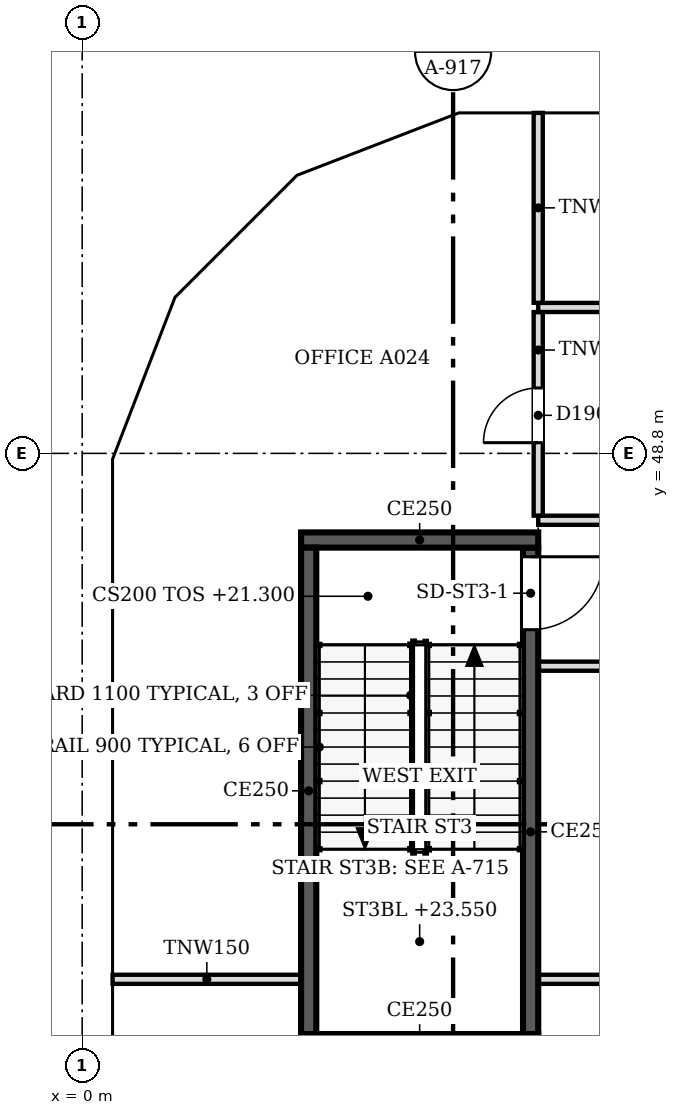
"""IFC4 building model, lengths in metres.
Left out: names, types, materials, properties, quantities, classifications, styles, units other than length and angle.
Written with IfcOpenShell. Run it as: python <this file> out.ifc"""

import sys

from ifc_helpers import new_model, si_unit, direction, frame, frame_2d, origin, place, context, subcontext, project, spatial, polyline, rectangle, outline, extrude, faceted_brep, source, transform, mapped, element, fill, save


model = new_model("IFC4")
c1 = context("Model", 3, precision=1e-05, world=origin(), true_north=direction((0.0, 1.0)))
c2 = subcontext(c1, "Body", "Model", "MODEL_VIEW")
j1 = project(units=[si_unit("LENGTHUNIT", "METRE"), si_unit("PLANEANGLEUNIT", "RADIAN")], contexts=[c1])
p1 = place(None, origin())
s1 = spatial("IfcSite", under=j1, at=p1, CompositionType="ELEMENT")
p2 = place(p1, origin())
s2 = spatial("IfcBuilding", under=s1, at=p2, CompositionType="ELEMENT")
p3 = place(p2, frame((0.0, 0.0, 21.3)))
s3 = spatial("IfcBuildingStorey", under=s2, at=p3, CompositionType="ELEMENT", Elevation=21.3)
m1 = source(origin(), c2, "Body", "Brep", [
    faceted_brep([(3.05, -0.25, 0.0), (6.053, -0.25, 4.5), (3.05, -0.25, 9.0), (0.0, -0.25, 4.5), (0.0, 0.25, 4.5), (3.05, 0.25, 9.0), (6.007, 0.25, 4.57), (6.007, 0.25, 4.43), (3.05, 0.25, 0.0), (6.053, 0.0, 4.5)], [[[0, 1, 2, 3]], [[4, 5, 6, 7, 8]], [[8, 7, 9, 1, 0]], [[6, 5, 2, 1, 9]], [[5, 4, 3, 2]], [[4, 8, 0, 3]], [[9, 7, 6]]]),
])
p4 = place(p3, frame((12.2, 54.65, -4.5), z_axis=(0.0, 0.0, 1.0), x_axis=(-1.0, 0.0, 0.0)))
e1 = element("IfcWall", 1, at=p4, inside=s3, PredefinedType="SOLIDWALL", context=c2, shape_type="MappedRepresentation", body=[
    mapped(m1, transform((0.0, 0.0, 0.0), scale=1.0)),
])
m2 = source(origin(), c2, "Body", "SweptSolid", [
    extrude(outline(polyline([(3.048, 0.448), (5.753, 4.5), (3.048, 8.552), (0.302, 4.5), (3.048, 0.448)])), frame((0.0, 0.26, 0.0), z_axis=(0.0, -1.0, 0.0), x_axis=(1.0, 0.0, 0.0)), (0.0, 0.0, 1.0), 0.52),
])
p5 = place(p4, origin())
e2 = element("IfcOpeningElement", 2, at=p5, cuts=e1, PredefinedType="OPENING", context=c2, shape_type="MappedRepresentation", body=[
    mapped(m2, transform((0.0, 0.0, 0.0), scale=1.0)),
])
m3 = source(origin(), c2, "Body", "Brep", [
    faceted_brep([(2.95, -0.25, 0.0), (3.003, -0.25, 0.081), (3.003, -0.25, 8.919), (2.95, -0.25, 9.0), (0.0, -0.25, 4.5), (0.047, 0.25, 4.571), (2.898, 0.25, 8.919), (2.898, 0.25, 0.081), (0.047, 0.25, 4.429), (2.95, 0.0, 0.0), (2.95, 0.0, 9.0), (0.0, 0.0, 4.5)], [[[0, 1, 2, 3, 4]], [[5, 6, 7, 8]], [[1, 0, 9]], [[10, 3, 2]], [[6, 5, 11, 4, 3, 10]], [[8, 7, 9, 0, 4, 11]], [[8, 11, 5]], [[1, 9, 7, 6, 10, 2]]]),
])
p6 = place(p3, frame((6.146, 54.65, -4.5), z_axis=(0.0, 0.0, 1.0), x_axis=(-0.932997369089, -0.359883188373, 0.0)))
e3 = element("IfcWall", 3, at=p6, inside=s3, PredefinedType="SOLIDWALL", context=c2, shape_type="MappedRepresentation", body=[
    mapped(m3, transform((0.0, 0.0, 0.0), scale=1.0)),
])
m4 = source(origin(), c2, "Body", "SweptSolid", [
    extrude(outline(polyline([(2.75, 8.239), (0.299, 4.5), (2.75, 0.761), (2.75, 8.239)])), frame((0.0, 0.26, 0.0), z_axis=(0.0, -1.0, 0.0), x_axis=(1.0, 0.0, 0.0)), (0.0, 0.0, 1.0), 0.52),
])
p7 = place(p6, origin())
e4 = element("IfcOpeningElement", 4, at=p7, cuts=e3, PredefinedType="OPENING", context=c2, shape_type="MappedRepresentation", body=[
    mapped(m4, transform((0.0, 0.0, 0.0), scale=1.0)),
])
m5 = source(origin(), c2, "Body", "Brep", [
    faceted_brep([(0.053, -0.25, 0.0), (2.997, -0.25, 4.5), (0.053, -0.25, 9.0), (0.0, -0.25, 8.919), (0.0, -0.25, 0.081), (0.106, 0.25, 8.919), (2.944, 0.25, 4.581), (2.944, 0.25, 4.419), (0.106, 0.25, 0.081), (2.997, 0.0, 4.5), (0.053, 0.0, 0.0), (0.053, 0.0, 9.0)], [[[0, 1, 2, 3, 4]], [[5, 6, 7, 8]], [[8, 7, 9, 1, 0, 10]], [[6, 5, 11, 2, 1, 9]], [[3, 2, 11]], [[10, 0, 4]], [[8, 10, 4, 3, 11, 5]], [[9, 7, 6]]]),
])
p8 = place(p3, frame((3.431, 53.625, -4.5), z_axis=(0.0, 0.0, 1.0), x_axis=(-0.707106781187, -0.707106781187, 0.0)))
e5 = element("IfcWall", 5, at=p8, inside=s3, PredefinedType="SOLIDWALL", context=c2, shape_type="MappedRepresentation", body=[
    mapped(m5, transform((0.0, 0.0, 0.0), scale=1.0)),
])
m6 = source(origin(), c2, "Body", "SweptSolid", [
    extrude(outline(polyline([(0.253, 0.762), (2.698, 4.5), (0.253, 8.238), (0.253, 0.762)])), frame((0.0, 0.26, 0.0), z_axis=(0.0, -1.0, 0.0), x_axis=(1.0, 0.0, 0.0)), (0.0, 0.0, 1.0), 0.52),
])
p9 = place(p8, origin())
e6 = element("IfcOpeningElement", 6, at=p9, cuts=e5, PredefinedType="OPENING", context=c2, shape_type="MappedRepresentation", body=[
    mapped(m6, transform((0.0, 0.0, 0.0), scale=1.0)),
])
m7 = source(origin(), c2, "Body", "Brep", [
    faceted_brep([(2.95, -0.25, 0.0), (2.997, -0.25, 0.07), (2.997, -0.25, 8.93), (2.95, -0.25, 9.0), (0.0, -0.25, 4.5), (0.053, 0.25, 4.581), (2.904, 0.25, 8.929), (2.904, 0.25, 0.071), (0.053, 0.25, 4.419), (2.95, 0.0, 0.0), (2.95, 0.0, 9.0), (0.0, 0.0, 4.5)], [[[0, 1, 2, 3, 4]], [[5, 6, 7, 8]], [[1, 0, 9]], [[10, 3, 2]], [[6, 5, 11, 4, 3, 10]], [[8, 7, 9, 0, 4, 11]], [[8, 11, 5]], [[1, 9, 7, 6, 10, 2]]]),
])
p10 = place(p3, frame((1.312, 51.506, -4.5), z_axis=(0.0, 0.0, 1.0), x_axis=(-0.359944998003, -0.932973525033, 0.0)))
e7 = element("IfcWall", 7, at=p10, inside=s3, PredefinedType="SOLIDWALL", context=c2, shape_type="MappedRepresentation", body=[
    mapped(m7, transform((0.0, 0.0, 0.0), scale=1.0)),
])
p11 = place(p10, origin())
e8 = element("IfcOpeningElement", 8, at=p11, cuts=e7, PredefinedType="OPENING", context=c2, shape_type="MappedRepresentation", body=[
    mapped(m4, transform((0.0, 0.0, 0.0), scale=1.0)),
])
m8 = source(origin(), c2, "Body", "Brep", [
    faceted_brep([(0.047, -0.25, 0.0), (3.05, -0.25, 4.5), (0.047, -0.25, 9.0), (0.0, -0.25, 8.929), (0.0, -0.25, 0.071), (0.093, 0.25, 8.93), (3.05, 0.25, 4.5), (0.093, 0.25, 0.07), (0.047, 0.0, 0.0), (0.047, 0.0, 9.0)], [[[0, 1, 2, 3, 4]], [[5, 6, 7]], [[7, 6, 1, 0, 8]], [[6, 5, 9, 2, 1]], [[3, 2, 9]], [[8, 0, 4]], [[7, 8, 4, 3, 9, 5]]]),
])
p12 = place(p3, frame((0.25, 48.8, -4.5), z_axis=(0.0, 0.0, 1.0), x_axis=(0.0, -1.0, 0.0)))
e9 = element("IfcWall", 9, at=p12, inside=s3, PredefinedType="SOLIDWALL", context=c2, shape_type="MappedRepresentation", body=[
    mapped(m8, transform((0.0, 0.0, 0.0), scale=1.0)),
])
m9 = source(origin(), c2, "Body", "SweptSolid", [
    extrude(outline(polyline([(0.247, 0.75), (2.75, 4.5), (0.247, 8.25), (0.247, 0.75)])), frame((0.0, 0.26, 0.0), z_axis=(0.0, -1.0, 0.0), x_axis=(1.0, 0.0, 0.0)), (0.0, 0.0, 1.0), 0.52),
])
p13 = place(p12, origin())
e10 = element("IfcOpeningElement", 10, at=p13, cuts=e9, PredefinedType="OPENING", context=c2, shape_type="MappedRepresentation", body=[
    mapped(m9, transform((0.0, 0.0, 0.0), scale=1.0)),
])
m10 = source(origin(), c2, "Body", "SweptSolid", [
    extrude(outline(polyline([(3.05, 0.0), (6.1, 4.5), (3.05, 9.0), (0.0, 4.5), (3.05, 0.0)])), frame((0.0, 0.25, 0.0), z_axis=(0.0, -1.0, 0.0), x_axis=(1.0, 0.0, 0.0)), (0.0, 0.0, 1.0), 0.5),
])
p14 = place(p3, frame((0.25, 45.75, -4.5), z_axis=(0.0, 0.0, 1.0), x_axis=(0.0, -1.0, 0.0)))
e11 = element("IfcWall", 11, at=p14, inside=s3, PredefinedType="SOLIDWALL", context=c2, shape_type="MappedRepresentation", body=[
    mapped(m10, transform((0.0, 0.0, 0.0), scale=1.0)),
])
m11 = source(origin(), c2, "Body", "SweptSolid", [
    extrude(outline(polyline([(3.05, 0.446), (5.798, 4.5), (3.05, 8.554), (0.302, 4.5), (3.05, 0.446)])), frame((0.0, 0.26, 0.0), z_axis=(0.0, -1.0, 0.0), x_axis=(1.0, 0.0, 0.0)), (0.0, 0.0, 1.0), 0.52),
])
p15 = place(p14, origin())
e12 = element("IfcOpeningElement", 12, at=p15, cuts=e11, PredefinedType="OPENING", context=c2, shape_type="MappedRepresentation", body=[
    mapped(m11, transform((0.0, 0.0, 0.0), scale=1.0)),
])
m12 = source(origin(), c2, "Body", "Brep", [
    faceted_brep([(3.05, -0.25, 0.0), (6.1, -0.25, 4.5), (6.1, -0.25, 4.5), (3.05, -0.25, 9.0), (0.0, -0.25, 4.5), (0.0, 0.25, 4.5), (3.05, 0.25, 9.0), (6.1, 0.25, 4.5), (6.1, 0.25, 4.5), (3.05, 0.25, 0.0)], [[[0, 1, 2, 3, 4]], [[5, 6, 7, 8, 9]], [[9, 8, 1, 0]], [[7, 6, 3, 2]], [[6, 5, 4, 3]], [[5, 9, 0, 4]], [[1, 8, 7, 2]]]),
])
p16 = place(p3, frame((0.25, 39.65, -4.5), z_axis=(0.0, 0.0, 1.0), x_axis=(0.0, -1.0, 0.0)))
e13 = element("IfcWall", 13, at=p16, inside=s3, PredefinedType="SOLIDWALL", context=c2, shape_type="MappedRepresentation", body=[
    mapped(m12, transform((0.0, 0.0, 0.0), scale=1.0)),
])
p17 = place(p16, origin())
e14 = element("IfcOpeningElement", 14, at=p17, cuts=e13, PredefinedType="OPENING", context=c2, shape_type="MappedRepresentation", body=[
    mapped(m11, transform((0.0, 0.0, 0.0), scale=1.0)),
])
m13 = source(origin(), c2, "Body", "Brep", [
    faceted_brep([(3.003, -0.25, 0.0), (3.05, -0.25, 0.071), (3.05, -0.25, 4.5), (0.0, -0.25, 4.5), (0.0, 0.25, 4.5), (2.957, 0.25, 4.5), (2.957, 0.25, 0.07), (3.003, 0.0, 0.0)], [[[0, 1, 2, 3]], [[4, 5, 6]], [[1, 0, 7]], [[5, 4, 3, 2]], [[4, 6, 7, 0, 3]], [[1, 7, 6, 5, 2]]]),
])
p18 = place(p3, frame((9.15, 54.65, 0.0), z_axis=(0.0, 0.0, 1.0), x_axis=(-1.0, 0.0, 0.0)))
e15 = element("IfcWall", 15, at=p18, inside=s3, PredefinedType="SOLIDWALL", context=c2, shape_type="MappedRepresentation", body=[
    mapped(m13, transform((0.0, 0.0, 0.0), scale=1.0)),
])
m14 = source(origin(), c2, "Body", "SweptSolid", [
    extrude(outline(polyline([(2.803, 4.25), (0.468, 4.25), (2.803, 0.75), (2.803, 4.25)])), frame((0.0, 0.26, 0.0), z_axis=(0.0, -1.0, 0.0), x_axis=(1.0, 0.0, 0.0)), (0.0, 0.0, 1.0), 0.52),
])
p19 = place(p18, origin())
e16 = element("IfcOpeningElement", 16, at=p19, cuts=e15, PredefinedType="OPENING", context=c2, shape_type="MappedRepresentation", body=[
    mapped(m14, transform((0.0, 0.0, 0.0), scale=1.0)),
])
m15 = source(origin(), c2, "Body", "Brep", [
    faceted_brep([(0.047, -0.25, 0.0), (2.997, -0.25, 4.5), (0.0, -0.25, 4.5), (0.0, -0.25, 0.07), (0.093, 0.25, 4.5), (2.944, 0.25, 4.5), (2.944, 0.25, 4.419), (0.093, 0.25, 0.071), (2.997, 0.0, 4.5), (0.047, 0.0, 0.0)], [[[0, 1, 2, 3]], [[4, 5, 6, 7]], [[7, 6, 8, 1, 0, 9]], [[5, 4, 2, 1, 8]], [[9, 0, 3]], [[7, 9, 3, 2, 4]], [[6, 5, 8]]]),
])
p20 = place(p3, frame((6.19, 54.667, 0.0), z_axis=(0.0, 0.0, 1.0), x_axis=(-0.932990326376, -0.359901446078, 0.0)))
e17 = element("IfcWall", 17, at=p20, inside=s3, PredefinedType="SOLIDWALL", context=c2, shape_type="MappedRepresentation", body=[
    mapped(m15, transform((0.0, 0.0, 0.0), scale=1.0)),
])
m16 = source(origin(), c2, "Body", "SweptSolid", [
    extrude(outline(polyline([(0.247, 0.761), (2.534, 4.25), (0.247, 4.25), (0.247, 0.761)])), frame((0.0, 0.26, 0.0), z_axis=(0.0, -1.0, 0.0), x_axis=(1.0, 0.0, 0.0)), (0.0, 0.0, 1.0), 0.52),
])
p21 = place(p20, origin())
e18 = element("IfcOpeningElement", 18, at=p21, cuts=e17, PredefinedType="OPENING", context=c2, shape_type="MappedRepresentation", body=[
    mapped(m16, transform((0.0, 0.0, 0.0), scale=1.0)),
])
m17 = source(origin(), c2, "Body", "Brep", [
    faceted_brep([(2.944, -0.25, 0.0), (2.997, -0.25, 0.081), (2.997, -0.25, 4.5), (0.0, -0.25, 4.5), (0.053, 0.25, 4.5), (2.891, 0.25, 4.5), (2.891, 0.25, 0.081), (0.053, 0.25, 4.419), (2.944, 0.0, 0.0), (0.0, 0.0, 4.5)], [[[0, 1, 2, 3]], [[4, 5, 6, 7]], [[1, 0, 8]], [[5, 4, 9, 3, 2]], [[7, 6, 8, 0, 3, 9]], [[7, 9, 4]], [[1, 8, 6, 5, 2]]]),
])
p22 = place(p3, frame((3.394, 53.588, 0.0), z_axis=(0.0, 0.0, 1.0), x_axis=(-0.707106781187, -0.707106781187, 0.0)))
e19 = element("IfcWall", 19, at=p22, inside=s3, PredefinedType="SOLIDWALL", context=c2, shape_type="MappedRepresentation", body=[
    mapped(m17, transform((0.0, 0.0, 0.0), scale=1.0)),
])
m18 = source(origin(), c2, "Body", "SweptSolid", [
    extrude(outline(polyline([(2.744, 4.25), (0.462, 4.25), (2.744, 0.762), (2.744, 4.25)])), frame((0.0, 0.26, 0.0), z_axis=(0.0, -1.0, 0.0), x_axis=(1.0, 0.0, 0.0)), (0.0, 0.0, 1.0), 0.52),
])
p23 = place(p22, origin())
e20 = element("IfcOpeningElement", 20, at=p23, cuts=e19, PredefinedType="OPENING", context=c2, shape_type="MappedRepresentation", body=[
    mapped(m18, transform((0.0, 0.0, 0.0), scale=1.0)),
])
m19 = source(origin(), c2, "Body", "Brep", [
    faceted_brep([(0.053, -0.25, 0.0), (3.003, -0.25, 4.5), (0.0, -0.25, 4.5), (0.0, -0.25, 0.081), (0.106, 0.25, 4.5), (2.957, 0.25, 4.5), (2.957, 0.25, 4.429), (0.106, 0.25, 0.081), (3.003, 0.0, 4.5), (0.053, 0.0, 0.0)], [[[0, 1, 2, 3]], [[4, 5, 6, 7]], [[7, 6, 8, 1, 0, 9]], [[5, 4, 2, 1, 8]], [[9, 0, 3]], [[7, 9, 3, 2, 4]], [[6, 5, 8]]]),
])
p24 = place(p3, frame((1.331, 51.556, 0.0), z_axis=(0.0, 0.0, 1.0), x_axis=(-0.35992665181, -0.932980602862, 0.0)))
e21 = element("IfcWall", 21, at=p24, inside=s3, PredefinedType="SOLIDWALL", context=c2, shape_type="MappedRepresentation", body=[
    mapped(m19, transform((0.0, 0.0, 0.0), scale=1.0)),
])
m20 = source(origin(), c2, "Body", "SweptSolid", [
    extrude(outline(polyline([(0.253, 0.761), (2.541, 4.25), (0.253, 4.25), (0.253, 0.761)])), frame((0.0, 0.26, 0.0), z_axis=(0.0, -1.0, 0.0), x_axis=(1.0, 0.0, 0.0)), (0.0, 0.0, 1.0), 0.52),
])
p25 = place(p24, origin())
e22 = element("IfcOpeningElement", 22, at=p25, cuts=e21, PredefinedType="OPENING", context=c2, shape_type="MappedRepresentation", body=[
    mapped(m20, transform((0.0, 0.0, 0.0), scale=1.0)),
])
m21 = source(origin(), c2, "Body", "Brep", [
    faceted_brep([(3.003, -0.25, 0.0), (6.053, -0.25, 4.5), (0.0, -0.25, 4.5), (0.047, 0.25, 4.5), (6.053, 0.25, 4.5), (3.003, 0.25, 0.0), (0.047, 0.25, 4.43), (0.0, 0.0, 4.5)], [[[0, 1, 2]], [[3, 4, 5, 6]], [[5, 4, 1, 0]], [[4, 3, 7, 2, 1]], [[6, 5, 0, 2, 7]], [[6, 7, 3]]]),
])
p26 = place(p3, frame((0.25, 48.753, 0.0), z_axis=(0.0, 0.0, 1.0), x_axis=(0.0, -1.0, 0.0)))
e23 = element("IfcWall", 23, at=p26, inside=s3, PredefinedType="SOLIDWALL", context=c2, shape_type="MappedRepresentation", body=[
    mapped(m21, transform((0.0, 0.0, 0.0), scale=1.0)),
])
m22 = source(origin(), c2, "Body", "SweptSolid", [
    extrude(outline(polyline([(3.005, 0.448), (5.582, 4.25), (0.468, 4.25), (3.005, 0.448)])), frame((0.0, 0.26, 0.0), z_axis=(0.0, -1.0, 0.0), x_axis=(1.0, 0.0, 0.0)), (0.0, 0.0, 1.0), 0.52),
])
p27 = place(p26, origin())
e24 = element("IfcOpeningElement", 24, at=p27, cuts=e23, PredefinedType="OPENING", context=c2, shape_type="MappedRepresentation", body=[
    mapped(m22, transform((0.0, 0.0, 0.0), scale=1.0)),
])
m23 = source(origin(), c2, "Body", "Brep", [
    faceted_brep([(3.05, -0.25, 0.0), (6.1, -0.25, 4.5), (6.1, -0.25, 4.5), (0.0, -0.25, 4.5), (0.0, 0.25, 4.5), (6.1, 0.25, 4.5), (6.1, 0.25, 4.5), (3.05, 0.25, 0.0)], [[[0, 1, 2, 3]], [[4, 5, 6, 7]], [[7, 6, 1, 0]], [[5, 4, 3, 2]], [[4, 7, 0, 3]], [[1, 6, 5, 2]]]),
])
p28 = place(p3, frame((0.25, 42.7, 0.0), z_axis=(0.0, 0.0, 1.0), x_axis=(0.0, -1.0, 0.0)))
e25 = element("IfcWall", 25, at=p28, inside=s3, PredefinedType="SOLIDWALL", context=c2, shape_type="MappedRepresentation", body=[
    mapped(m23, transform((0.0, 0.0, 0.0), scale=1.0)),
])
m24 = source(origin(), c2, "Body", "SweptSolid", [
    extrude(outline(polyline([(3.05, 0.446), (5.629, 4.25), (0.471, 4.25), (3.05, 0.446)])), frame((0.0, 0.26, 0.0), z_axis=(0.0, -1.0, 0.0), x_axis=(1.0, 0.0, 0.0)), (0.0, 0.0, 1.0), 0.52),
])
p29 = place(p28, origin())
e26 = element("IfcOpeningElement", 26, at=p29, cuts=e25, PredefinedType="OPENING", context=c2, shape_type="MappedRepresentation", body=[
    mapped(m24, transform((0.0, 0.0, 0.0), scale=1.0)),
])
p30 = place(p3, frame((7.5, 39.125, 0.0), z_axis=(0.0, 0.0, 1.0), x_axis=(-1.0, 0.0, 0.0)))
e27 = element("IfcWall", 27, at=p30, inside=s3, PredefinedType="SOLIDWALL", context=c2, shape_type="SweptSolid", body=[
    extrude(rectangle(XDim=3.9, YDim=0.25, at=frame_2d((1.95, 0.0))), origin(), (0.0, 0.0, 1.0), 4.5),
])
p31 = place(p3, frame((3.725, 39.25, 0.0), z_axis=(0.0, 0.0, 1.0), x_axis=(0.0, 1.0, 0.0)))
e28 = element("IfcWall", 28, at=p31, inside=s3, PredefinedType="SOLIDWALL", context=c2, shape_type="SweptSolid", body=[
    extrude(rectangle(XDim=8.0, YDim=0.25, at=frame_2d((4.0, 0.0))), origin(), (0.0, 0.0, 1.0), 4.5),
])
p32 = place(p3, frame((3.6, 47.375, 0.0), z_axis=(0.0, 0.0, 1.0), x_axis=(1.0, 0.0, 0.0)))
e29 = element("IfcWall", 29, at=p32, inside=s3, PredefinedType="SOLIDWALL", context=c2, shape_type="SweptSolid", body=[
    extrude(rectangle(XDim=3.9, YDim=0.25, at=frame_2d((1.95, 0.0))), origin(), (0.0, 0.0, 1.0), 4.5),
])
p33 = place(p3, frame((7.375, 47.25, 0.0), z_axis=(0.0, 0.0, 1.0), x_axis=(0.0, -1.0, 0.0)))
e30 = element("IfcWall", 30, at=p33, inside=s3, PredefinedType="SOLIDWALL", context=c2, shape_type="SweptSolid", body=[
    extrude(rectangle(XDim=8.0, YDim=0.25, at=frame_2d((4.0, 0.0))), origin(), (0.0, 0.0, 1.0), 4.5),
])
m25 = source(origin(), c2, "Body", "SweptSolid", [
    extrude(rectangle(XDim=1.2, YDim=2.1, at=frame_2d((0.6, 1.05))), frame((0.0, 0.135, 0.0), z_axis=(0.0, -1.0, 0.0), x_axis=(1.0, 0.0, 0.0)), (0.0, 0.0, 1.0), 0.27),
])
p34 = place(p33, frame((0.15, 0.0, 0.0)))
e31 = element("IfcOpeningElement", 31, at=p34, cuts=e30, PredefinedType="OPENING", context=c2, shape_type="MappedRepresentation", body=[
    mapped(m25, transform((0.0, 0.0, 0.0), scale=1.0)),
])
p35 = place(p3, frame((0.5, 40.15, 0.0), z_axis=(0.0, 0.0, 1.0), x_axis=(1.0, 0.0, 0.0)))
e32 = element("IfcWall", 32, at=p35, inside=s3, PredefinedType="PARTITIONING", context=c2, shape_type="SweptSolid", body=[
    extrude(rectangle(XDim=3.1, YDim=0.15, at=frame_2d((1.55, 0.0))), origin(), (0.0, 0.0, 1.0), 3.767),
])
p36 = place(p3, frame((7.5, 40.15, 0.0), z_axis=(0.0, 0.0, 1.0), x_axis=(1.0, 0.0, 0.0)))
e33 = element("IfcWall", 33, at=p36, inside=s3, PredefinedType="PARTITIONING", context=c2, shape_type="SweptSolid", body=[
    extrude(rectangle(XDim=20.524, YDim=0.15, at=frame_2d((10.262, 0.0))), origin(), (0.0, 0.0, 1.0), 3.767),
])
p37 = place(p3, frame((7.5, 45.3, 0.0), z_axis=(0.0, 0.0, 1.0), x_axis=(1.0, 0.0, 0.0)))
e34 = element("IfcWall", 34, at=p37, inside=s3, PredefinedType="PARTITIONING", context=c2, shape_type="SweptSolid", body=[
    extrude(rectangle(XDim=20.6, YDim=0.15, at=frame_2d((10.3, 0.0))), origin(), (0.0, 0.0, 1.0), 3.767),
])
p38 = place(p3, frame((7.5, 47.7, 0.0), z_axis=(0.0, 0.0, 1.0), x_axis=(1.0, 0.0, 0.0)))
e35 = element("IfcWall", 35, at=p38, inside=s3, PredefinedType="PARTITIONING", context=c2, shape_type="SweptSolid", body=[
    extrude(rectangle(XDim=20.6, YDim=0.15, at=frame_2d((10.3, 0.0))), origin(), (0.0, 0.0, 1.0), 3.767),
])
m26 = source(origin(), c2, "Body", "SweptSolid", [
    extrude(rectangle(XDim=1.8, YDim=2.1, at=frame_2d((0.9, 1.05))), frame((0.0, 0.085, 0.0), z_axis=(0.0, -1.0, 0.0), x_axis=(1.0, 0.0, 0.0)), (0.0, 0.0, 1.0), 0.17),
])
p39 = place(p38, frame((14.501, 0.0, 0.0)))
e36 = element("IfcOpeningElement", 36, at=p39, cuts=e35, PredefinedType="OPENING", context=c2, shape_type="MappedRepresentation", body=[
    mapped(m26, transform((0.0, 0.0, 0.0), scale=1.0)),
])
p40 = place(p38, frame((5.3, 0.0, 0.0)))
e37 = element("IfcOpeningElement", 37, at=p40, cuts=e35, PredefinedType="OPENING", context=c2, shape_type="MappedRepresentation", body=[
    mapped(m26, transform((0.0, 0.0, 0.0), scale=1.0)),
])
p41 = place(p3, frame((7.5, 47.776, 0.0), z_axis=(0.0, 0.0, 1.0), x_axis=(0.0, 1.0, 0.0)))
e38 = element("IfcWall", 38, at=p41, inside=s3, PredefinedType="PARTITIONING", context=c2, shape_type="SweptSolid", body=[
    extrude(rectangle(XDim=3.348, YDim=0.15, at=frame_2d((1.674, 0.0))), origin(), (0.0, 0.0, 1.0), 3.767),
])
m27 = source(origin(), c2, "Body", "SweptSolid", [
    extrude(rectangle(XDim=0.9, YDim=2.1, at=frame_2d((0.45, 1.05))), frame((0.0, 0.085, 0.0), z_axis=(0.0, -1.0, 0.0), x_axis=(1.0, 0.0, 0.0)), (0.0, 0.0, 1.0), 0.17),
])
p42 = place(p41, frame((1.2, 0.0, 0.0)))
e39 = element("IfcOpeningElement", 39, at=p42, cuts=e38, PredefinedType="OPENING", context=c2, shape_type="MappedRepresentation", body=[
    mapped(m27, transform((0.0, 0.0, 0.0), scale=1.0)),
])
p43 = place(p3, frame((7.5, 51.2, 0.0), z_axis=(0.0, 0.0, 1.0), x_axis=(1.0, 0.0, 0.0)))
e40 = element("IfcWall", 40, at=p43, inside=s3, PredefinedType="PARTITIONING", context=c2, shape_type="SweptSolid", body=[
    extrude(rectangle(XDim=20.599, YDim=0.15, at=frame_2d((10.3, 0.0))), origin(), (0.0, 0.0, 1.0), 3.767),
])
p44 = place(p43, frame((15.501, 0.0, 0.0)))
e41 = element("IfcOpeningElement", 41, at=p44, cuts=e40, PredefinedType="OPENING", context=c2, shape_type="MappedRepresentation", body=[
    mapped(m26, transform((0.0, 0.0, 0.0), scale=1.0)),
])
p45 = place(p43, frame((5.2, 0.0, 0.0)))
e42 = element("IfcOpeningElement", 42, at=p45, cuts=e40, PredefinedType="OPENING", context=c2, shape_type="MappedRepresentation", body=[
    mapped(m26, transform((0.0, 0.0, 0.0), scale=1.0)),
])
p46 = place(p3, frame((7.5, 51.276, 0.0), z_axis=(0.0, 0.0, 1.0), x_axis=(0.0, 1.0, 0.0)))
e43 = element("IfcWall", 43, at=p46, inside=s3, PredefinedType="PARTITIONING", context=c2, shape_type="SweptSolid", body=[
    extrude(rectangle(XDim=3.124, YDim=0.15, at=frame_2d((1.562, 0.0))), origin(), (0.0, 0.0, 1.0), 3.767),
])
m28 = source(origin(), c2, "Body", "SweptSolid", [
    extrude(rectangle(XDim=1.2, YDim=2.1, at=frame_2d((0.6, 1.05))), frame((0.0, 0.025, 0.0), z_axis=(0.0, -1.0, 0.0), x_axis=(1.0, 0.0, 0.0)), (0.0, 0.0, 1.0), 0.05),
])
p47 = place(p34, origin())
e44 = element("IfcDoor", 44, at=p47, inside=s3, OperationType="SINGLE_SWING_LEFT", PredefinedType="DOOR", context=c2, shape_type="MappedRepresentation", body=[
    mapped(m28, transform((0.0, 0.0, 0.0), scale=1.0)),
])
fill(e31, e44)
m29 = source(origin(), c2, "Body", "SweptSolid", [
    extrude(rectangle(XDim=0.9, YDim=2.1, at=frame_2d((0.45, 1.05))), frame((0.0, 0.025, 0.0), z_axis=(0.0, -1.0, 0.0), x_axis=(1.0, 0.0, 0.0)), (0.0, 0.0, 1.0), 0.05),
])
p48 = place(p42, origin())
e45 = element("IfcDoor", 45, at=p48, inside=s3, OperationType="SINGLE_SWING_LEFT", PredefinedType="DOOR", context=c2, shape_type="MappedRepresentation", body=[
    mapped(m29, transform((0.0, 0.0, 0.0), scale=1.0)),
])
fill(e39, e45)
save(model, sys.argv[1])
